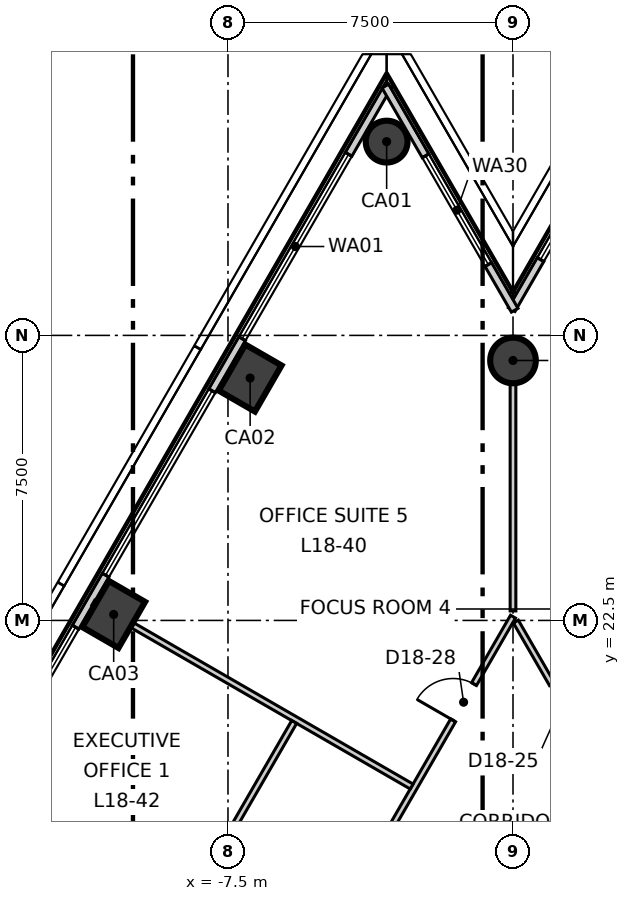
"""IFC4 building model, lengths in metres.
Left out: names, types, materials, properties, quantities, classifications, styles, units other than length and angle.
Written with IfcOpenShell. Run it as: python <this file> out.ifc"""

import sys

from ifc_helpers import new_model, si_unit, direction, frame, frame_2d, origin, origin_2d, place, context, subcontext, project, spatial, rectangle, circle, extrude, element, fill, save


model = new_model("IFC4")
c1 = context("Model", 3, precision=1e-05, world=origin(), true_north=direction((0.0, 1.0)))
c2 = subcontext(c1, "Body", "Model", "MODEL_VIEW")
j1 = project(units=[si_unit("LENGTHUNIT", "METRE"), si_unit("PLANEANGLEUNIT", "RADIAN")], contexts=[c1])
p1 = place(None, origin())
s1 = spatial("IfcSite", under=j1, at=p1, CompositionType="ELEMENT")
p2 = place(p1, origin())
s2 = spatial("IfcBuilding", under=s1, at=p2, CompositionType="ELEMENT")
p3 = place(p2, frame((0.0, 0.0, 83.3)))
s3 = spatial("IfcBuildingStorey", under=s2, at=p3, CompositionType="ELEMENT", Elevation=83.3)
p4 = place(p3, frame((-3.325, 35.099, -0.3), z_axis=(0.0, 0.0, 1.0), x_axis=(0.5, 0.866025403784, 0.0)))
e1 = element("IfcColumn", 1, at=p4, inside=s3, PredefinedType="COLUMN", context=c2, shape_type="SweptSolid", body=[
    extrude(circle(Radius=0.55, at=origin_2d()), origin(), (0.0, 0.0, 1.0), 4.0),
])
for number, where, z_axis, x_axis in (
    (2, (-6.917, 28.878, -0.3), (0.0, 0.0, 1.0), (0.5, 0.866, 0.0)),
    (3, (-10.508, 22.657, -0.3), (0.0, 0.0, 1.0), (0.5, 0.866, 0.0)),
):
    element("IfcColumn", number, at=place(p3, frame(where, z_axis=z_axis, x_axis=x_axis)), inside=s3, PredefinedType="COLUMN", context=c2, shape_type="SweptSolid", body=[
        extrude(rectangle(XDim=1.4, YDim=1.1, at=origin_2d()), origin(), (0.0, 0.0, 1.0), 4.0),
    ])
p5 = place(p3, frame((0.0, 29.34, -0.3), z_axis=(0.0, 0.0, 1.0), x_axis=(1.0, 0.0, 0.0)))
e4 = element("IfcColumn", 4, at=p5, inside=s3, PredefinedType="COLUMN", context=c2, shape_type="SweptSolid", body=[
    extrude(circle(Radius=0.6, at=origin_2d()), origin(), (0.0, 0.0, 1.0), 4.0),
])
p6 = place(p3, frame((-3.28, 36.577, 0.0), z_axis=(0.0, 0.0, 1.0), x_axis=(-0.500001635065, -0.866024459777, 0.0)))
e5 = element("IfcWall", 5, at=p6, inside=s3, PredefinedType="ELEMENTEDWALL", context=c2, shape_type="SweptSolid", body=[
    extrude(rectangle(XDim=60.053, YDim=0.2, at=frame_2d((30.027, 0.0))), origin(), (0.0, 0.0, 1.0), 3.7),
])
p7 = place(p6, frame((2.094, 0.0, 0.9)))
e6 = element("IfcOpeningElement", 6, at=p7, cuts=e5, PredefinedType="OPENING", context=c2, shape_type="SweptSolid", body=[
    extrude(rectangle(XDim=5.6, YDim=2.5, at=frame_2d((2.8, 1.25))), frame((0.0, 0.11, 0.0), z_axis=(0.0, -1.0, 0.0), x_axis=(1.0, 0.0, 0.0)), (0.0, 0.0, 1.0), 0.22),
])
p8 = place(p6, frame((9.278, 0.0, 0.9)))
e7 = element("IfcOpeningElement", 7, at=p8, cuts=e5, PredefinedType="OPENING", context=c2, shape_type="SweptSolid", body=[
    extrude(rectangle(XDim=5.6, YDim=2.5, at=frame_2d((2.8, 1.25))), frame((0.0, 0.11, 0.0), z_axis=(0.0, -1.0, 0.0), x_axis=(1.0, 0.0, 0.0)), (0.0, 0.0, 1.0), 0.22),
])
p9 = place(p6, frame((16.461, 0.0, 0.9)))
e8 = element("IfcOpeningElement", 8, at=p9, cuts=e5, PredefinedType="OPENING", context=c2, shape_type="SweptSolid", body=[
    extrude(rectangle(XDim=5.6, YDim=2.5, at=frame_2d((2.8, 1.25))), frame((0.0, 0.11, 0.0), z_axis=(0.0, -1.0, 0.0), x_axis=(1.0, 0.0, 0.0)), (0.0, 0.0, 1.0), 0.22),
])
p10 = place(p6, frame((23.645, 0.0, 0.9)))
e9 = element("IfcOpeningElement", 9, at=p10, cuts=e5, PredefinedType="OPENING", context=c2, shape_type="SweptSolid", body=[
    extrude(rectangle(XDim=5.6, YDim=2.5, at=frame_2d((2.8, 1.25))), frame((0.0, 0.11, 0.0), z_axis=(0.0, -1.0, 0.0), x_axis=(1.0, 0.0, 0.0)), (0.0, 0.0, 1.0), 0.22),
])
p11 = place(p6, frame((30.828, 0.0, 0.9)))
e10 = element("IfcOpeningElement", 10, at=p11, cuts=e5, PredefinedType="OPENING", context=c2, shape_type="SweptSolid", body=[
    extrude(rectangle(XDim=5.6, YDim=2.5, at=frame_2d((2.8, 1.25))), frame((0.0, 0.11, 0.0), z_axis=(0.0, -1.0, 0.0), x_axis=(1.0, 0.0, 0.0)), (0.0, 0.0, 1.0), 0.22),
])
p12 = place(p6, frame((38.012, 0.0, 0.9)))
e11 = element("IfcOpeningElement", 11, at=p12, cuts=e5, PredefinedType="OPENING", context=c2, shape_type="SweptSolid", body=[
    extrude(rectangle(XDim=5.6, YDim=2.5, at=frame_2d((2.8, 1.25))), frame((0.0, 0.11, 0.0), z_axis=(0.0, -1.0, 0.0), x_axis=(1.0, 0.0, 0.0)), (0.0, 0.0, 1.0), 0.22),
])
p13 = place(p6, frame((45.195, 0.0, 0.9)))
e12 = element("IfcOpeningElement", 12, at=p13, cuts=e5, PredefinedType="OPENING", context=c2, shape_type="SweptSolid", body=[
    extrude(rectangle(XDim=5.6, YDim=2.5, at=frame_2d((2.8, 1.25))), frame((0.0, 0.11, 0.0), z_axis=(0.0, -1.0, 0.0), x_axis=(1.0, 0.0, 0.0)), (0.0, 0.0, 1.0), 0.22),
])
p14 = place(p6, frame((52.379, 0.0, 0.9)))
e13 = element("IfcOpeningElement", 13, at=p14, cuts=e5, PredefinedType="OPENING", context=c2, shape_type="SweptSolid", body=[
    extrude(rectangle(XDim=5.6, YDim=2.5, at=frame_2d((2.8, 1.25))), frame((0.0, 0.11, 0.0), z_axis=(0.0, -1.0, 0.0), x_axis=(1.0, 0.0, 0.0)), (0.0, 0.0, 1.0), 0.22),
])
p15 = place(p3, frame((3.37, 36.577, 0.0), z_axis=(0.0, 0.0, 1.0), x_axis=(-0.499983120418, -0.866035148996, 0.0)))
e14 = element("IfcWall", 14, at=p15, inside=s3, PredefinedType="ELEMENTEDWALL", context=c2, shape_type="SweptSolid", body=[
    extrude(rectangle(XDim=6.81, YDim=0.2, at=frame_2d((3.405, 0.0))), origin(), (0.0, 0.0, 1.0), 3.7),
])
p16 = place(p15, frame((1.99, 0.0, 0.9)))
e15 = element("IfcOpeningElement", 15, at=p16, cuts=e14, PredefinedType="OPENING", context=c2, shape_type="SweptSolid", body=[
    extrude(rectangle(XDim=3.3, YDim=2.5, at=frame_2d((1.65, 1.25))), frame((0.0, 0.11, 0.0), z_axis=(0.0, -1.0, 0.0), x_axis=(1.0, 0.0, 0.0)), (0.0, 0.0, 1.0), 0.22),
])
p17 = place(p3, frame((0.045, 30.662, 0.0), z_axis=(0.0, 0.0, 1.0), x_axis=(-0.499983120418, 0.866035148996, 0.0)))
e16 = element("IfcWall", 16, at=p17, inside=s3, PredefinedType="ELEMENTEDWALL", context=c2, shape_type="SweptSolid", body=[
    extrude(rectangle(XDim=6.81, YDim=0.2, at=frame_2d((3.405, 0.0))), origin(), (0.0, 0.0, 1.0), 3.7),
])
p18 = place(p17, frame((1.39, 0.0, 0.9)))
e17 = element("IfcOpeningElement", 17, at=p18, cuts=e16, PredefinedType="OPENING", context=c2, shape_type="SweptSolid", body=[
    extrude(rectangle(XDim=3.3, YDim=2.5, at=frame_2d((1.65, 1.25))), frame((0.0, 0.11, 0.0), z_axis=(0.0, -1.0, 0.0), x_axis=(1.0, 0.0, 0.0)), (0.0, 0.0, 1.0), 0.22),
])
p19 = place(p3, frame((-19.497, -11.17, 0.0), z_axis=(0.0, 0.0, 1.0), x_axis=(0.499998854553, 0.866026065108, 0.0)))
e18 = element("IfcWall", 18, at=p19, inside=s3, PredefinedType="PARTITIONING", context=c2, shape_type="SweptSolid", body=[
    extrude(rectangle(XDim=38.994, YDim=0.15, at=frame_2d((19.497, 0.0))), origin(), (0.0, 0.0, 1.0), 3.7),
])
p20 = place(p19, frame((35.844, 0.0, 0.0)))
e19 = element("IfcOpeningElement", 19, at=p20, cuts=e18, PredefinedType="OPENING", context=c2, shape_type="SweptSolid", body=[
    extrude(rectangle(XDim=1.1, YDim=2.1, at=frame_2d((0.55, 1.05))), frame((0.0, 0.085, 0.0), z_axis=(0.0, -1.0, 0.0), x_axis=(1.0, 0.0, 0.0)), (0.0, 0.0, 1.0), 0.17),
])
p21 = place(p19, frame((26.04, 0.0, 0.0)))
e20 = element("IfcOpeningElement", 20, at=p21, cuts=e18, PredefinedType="OPENING", context=c2, shape_type="SweptSolid", body=[
    extrude(rectangle(XDim=1.1, YDim=2.1, at=frame_2d((0.55, 1.05))), frame((0.0, 0.085, 0.0), z_axis=(0.0, -1.0, 0.0), x_axis=(1.0, 0.0, 0.0)), (0.0, 0.0, 1.0), 0.17),
])
p22 = place(p19, frame((7.272, 0.0, 0.0)))
e21 = element("IfcOpeningElement", 21, at=p22, cuts=e18, PredefinedType="OPENING", context=c2, shape_type="SweptSolid", body=[
    extrude(rectangle(XDim=1.1, YDim=2.1, at=frame_2d((0.55, 1.05))), frame((0.0, 0.085, 0.0), z_axis=(0.0, -1.0, 0.0), x_axis=(1.0, 0.0, 0.0)), (0.0, 0.0, 1.0), 0.17),
])
p23 = place(p19, frame((17.372, 0.0, 0.0)))
e22 = element("IfcOpeningElement", 22, at=p23, cuts=e18, PredefinedType="OPENING", context=c2, shape_type="SweptSolid", body=[
    extrude(rectangle(XDim=0.9, YDim=2.1, at=frame_2d((0.45, 1.05))), frame((0.0, 0.085, 0.0), z_axis=(0.0, -1.0, 0.0), x_axis=(1.0, 0.0, 0.0)), (0.0, 0.0, 1.0), 0.17),
])
p24 = place(p19, frame((14.172, 0.0, 0.0)))
e23 = element("IfcOpeningElement", 23, at=p24, cuts=e18, PredefinedType="OPENING", context=c2, shape_type="SweptSolid", body=[
    extrude(rectangle(XDim=0.9, YDim=2.1, at=frame_2d((0.45, 1.05))), frame((0.0, 0.085, 0.0), z_axis=(0.0, -1.0, 0.0), x_axis=(1.0, 0.0, 0.0)), (0.0, 0.0, 1.0), 0.17),
])
p25 = place(p19, frame((11.272, 0.0, 0.0)))
e24 = element("IfcOpeningElement", 24, at=p25, cuts=e18, PredefinedType="OPENING", context=c2, shape_type="SweptSolid", body=[
    extrude(rectangle(XDim=1.0, YDim=2.1, at=frame_2d((0.5, 1.05))), frame((0.0, 0.085, 0.0), z_axis=(0.0, -1.0, 0.0), x_axis=(1.0, 0.0, 0.0)), (0.0, 0.0, 1.0), 0.17),
])
p26 = place(p19, frame((1.904, 0.0, 0.0)))
e25 = element("IfcOpeningElement", 25, at=p26, cuts=e18, PredefinedType="OPENING", context=c2, shape_type="SweptSolid", body=[
    extrude(rectangle(XDim=1.1, YDim=2.1, at=frame_2d((0.55, 1.05))), frame((0.0, 0.085, 0.0), z_axis=(0.0, -1.0, 0.0), x_axis=(1.0, 0.0, 0.0)), (0.0, 0.0, 1.0), 0.17),
])
p27 = place(p3, frame((-11.045, 22.967, 0.0), z_axis=(0.0, 0.0, 1.0), x_axis=(0.866018320735, -0.500012268001, 0.0)))
e26 = element("IfcWall", 26, at=p27, inside=s3, PredefinedType="PARTITIONING", context=c2, shape_type="SweptSolid", body=[
    extrude(rectangle(XDim=9.674, YDim=0.15, at=frame_2d((4.837, 0.0))), origin(), (0.0, 0.0, 1.0), 3.7),
])
p28 = place(p3, frame((0.0, 22.75, 0.0), z_axis=(0.0, 0.0, 1.0), x_axis=(0.0, 1.0, 0.0)))
e27 = element("IfcWall", 27, at=p28, inside=s3, PredefinedType="PARTITIONING", context=c2, shape_type="SweptSolid", body=[
    extrude(rectangle(XDim=7.21, YDim=0.15, at=frame_2d((3.605, 0.0))), origin(), (0.0, 0.0, 1.0), 3.15),
])
p29 = place(p3, frame((0.075, 22.47, 0.0), z_axis=(0.0, 0.0, 1.0), x_axis=(0.500002280369, -0.866024087209, 0.0)))
e28 = element("IfcWall", 28, at=p29, inside=s3, PredefinedType="PARTITIONING", context=c2, shape_type="SweptSolid", body=[
    extrude(rectangle(XDim=38.844, YDim=0.15, at=frame_2d((19.422, 0.0))), origin(), (0.0, 0.0, 1.0), 3.7),
])
p30 = place(p29, frame((35.844, 0.0, 0.0)))
e29 = element("IfcOpeningElement", 29, at=p30, cuts=e28, PredefinedType="OPENING", context=c2, shape_type="SweptSolid", body=[
    extrude(rectangle(XDim=1.1, YDim=2.1, at=frame_2d((0.55, 1.05))), frame((0.0, 0.085, 0.0), z_axis=(0.0, -1.0, 0.0), x_axis=(1.0, 0.0, 0.0)), (0.0, 0.0, 1.0), 0.17),
])
p31 = place(p29, frame((14.44, 0.0, 0.0)))
e30 = element("IfcOpeningElement", 30, at=p31, cuts=e28, PredefinedType="OPENING", context=c2, shape_type="SweptSolid", body=[
    extrude(rectangle(XDim=1.1, YDim=2.1, at=frame_2d((0.55, 1.05))), frame((0.0, 0.085, 0.0), z_axis=(0.0, -1.0, 0.0), x_axis=(1.0, 0.0, 0.0)), (0.0, 0.0, 1.0), 0.17),
])
p32 = place(p29, frame((31.74, 0.0, 0.0)))
e31 = element("IfcOpeningElement", 31, at=p32, cuts=e28, PredefinedType="OPENING", context=c2, shape_type="SweptSolid", body=[
    extrude(rectangle(XDim=0.9, YDim=2.1, at=frame_2d((0.45, 1.05))), frame((0.0, 0.085, 0.0), z_axis=(0.0, -1.0, 0.0), x_axis=(1.0, 0.0, 0.0)), (0.0, 0.0, 1.0), 0.17),
])
p33 = place(p29, frame((28.54, 0.0, 0.0)))
e32 = element("IfcOpeningElement", 32, at=p33, cuts=e28, PredefinedType="OPENING", context=c2, shape_type="SweptSolid", body=[
    extrude(rectangle(XDim=0.9, YDim=2.1, at=frame_2d((0.45, 1.05))), frame((0.0, 0.085, 0.0), z_axis=(0.0, -1.0, 0.0), x_axis=(1.0, 0.0, 0.0)), (0.0, 0.0, 1.0), 0.17),
])
p34 = place(p29, frame((25.74, 0.0, 0.0)))
e33 = element("IfcOpeningElement", 33, at=p34, cuts=e28, PredefinedType="OPENING", context=c2, shape_type="SweptSolid", body=[
    extrude(rectangle(XDim=1.0, YDim=2.1, at=frame_2d((0.5, 1.05))), frame((0.0, 0.085, 0.0), z_axis=(0.0, -1.0, 0.0), x_axis=(1.0, 0.0, 0.0)), (0.0, 0.0, 1.0), 0.17),
])
p35 = place(p29, frame((1.905, 0.0, 0.0)))
e34 = element("IfcOpeningElement", 34, at=p35, cuts=e28, PredefinedType="OPENING", context=c2, shape_type="SweptSolid", body=[
    extrude(rectangle(XDim=1.1, YDim=2.1, at=frame_2d((0.55, 1.05))), frame((0.0, 0.085, 0.0), z_axis=(0.0, -1.0, 0.0), x_axis=(1.0, 0.0, 0.0)), (0.0, 0.0, 1.0), 0.17),
])
p36 = place(p3, frame((-12.866, 7.515, 0.0), z_axis=(0.0, 0.0, 1.0), x_axis=(0.499947407797, 0.866055765778, 0.0)))
e35 = element("IfcWall", 35, at=p36, inside=s3, PredefinedType="PARTITIONING", context=c2, shape_type="SweptSolid", body=[
    extrude(rectangle(XDim=14.217, YDim=0.15, at=frame_2d((7.109, 0.0))), origin(), (0.0, 0.0, 1.0), 3.7),
])
p37 = place(p36, frame((6.642, 0.0, 0.0)))
e36 = element("IfcOpeningElement", 36, at=p37, cuts=e35, PredefinedType="OPENING", context=c2, shape_type="SweptSolid", body=[
    extrude(rectangle(XDim=1.0, YDim=2.1, at=frame_2d((0.5, 1.05))), frame((0.0, 0.085, 0.0), z_axis=(0.0, -1.0, 0.0), x_axis=(1.0, 0.0, 0.0)), (0.0, 0.0, 1.0), 0.17),
])
p38 = place(p7, origin())
e37 = element("IfcWindow", 37, at=p38, inside=s3, PartitioningType="SINGLE_PANEL", PredefinedType="WINDOW", context=c2, shape_type="SweptSolid", body=[
    extrude(rectangle(XDim=5.6, YDim=2.5, at=frame_2d((2.8, 1.25))), frame((0.0, 0.03, 0.0), z_axis=(0.0, -1.0, 0.0), x_axis=(1.0, 0.0, 0.0)), (0.0, 0.0, 1.0), 0.06),
])
fill(e6, e37)
p39 = place(p8, origin())
e38 = element("IfcWindow", 38, at=p39, inside=s3, PartitioningType="SINGLE_PANEL", PredefinedType="WINDOW", context=c2, shape_type="SweptSolid", body=[
    extrude(rectangle(XDim=5.6, YDim=2.5, at=frame_2d((2.8, 1.25))), frame((0.0, 0.03, 0.0), z_axis=(0.0, -1.0, 0.0), x_axis=(1.0, 0.0, 0.0)), (0.0, 0.0, 1.0), 0.06),
])
fill(e7, e38)
p40 = place(p9, origin())
e39 = element("IfcWindow", 39, at=p40, inside=s3, PartitioningType="SINGLE_PANEL", PredefinedType="WINDOW", context=c2, shape_type="SweptSolid", body=[
    extrude(rectangle(XDim=5.6, YDim=2.5, at=frame_2d((2.8, 1.25))), frame((0.0, 0.03, 0.0), z_axis=(0.0, -1.0, 0.0), x_axis=(1.0, 0.0, 0.0)), (0.0, 0.0, 1.0), 0.06),
])
fill(e8, e39)
p41 = place(p16, origin())
e40 = element("IfcWindow", 40, at=p41, inside=s3, PartitioningType="SINGLE_PANEL", PredefinedType="WINDOW", context=c2, shape_type="SweptSolid", body=[
    extrude(rectangle(XDim=3.3, YDim=2.5, at=frame_2d((1.65, 1.25))), frame((0.0, 0.03, 0.0), z_axis=(0.0, -1.0, 0.0), x_axis=(1.0, 0.0, 0.0)), (0.0, 0.0, 1.0), 0.06),
])
fill(e15, e40)
p42 = place(p18, origin())
e41 = element("IfcWindow", 41, at=p42, inside=s3, PartitioningType="SINGLE_PANEL", PredefinedType="WINDOW", context=c2, shape_type="SweptSolid", body=[
    extrude(rectangle(XDim=3.3, YDim=2.5, at=frame_2d((1.65, 1.25))), frame((0.0, 0.03, 0.0), z_axis=(0.0, -1.0, 0.0), x_axis=(1.0, 0.0, 0.0)), (0.0, 0.0, 1.0), 0.06),
])
fill(e17, e41)
p43 = place(p20, origin())
e42 = element("IfcDoor", 42, at=p43, inside=s3, OperationType="SINGLE_SWING_RIGHT", PredefinedType="DOOR", context=c2, shape_type="SweptSolid", body=[
    extrude(rectangle(XDim=1.1, YDim=2.1, at=frame_2d((0.55, 1.05))), frame((0.0, 0.025, 0.0), z_axis=(0.0, -1.0, 0.0), x_axis=(1.0, 0.0, 0.0)), (0.0, 0.0, 1.0), 0.05),
])
fill(e19, e42)
save(model, sys.argv[1])
